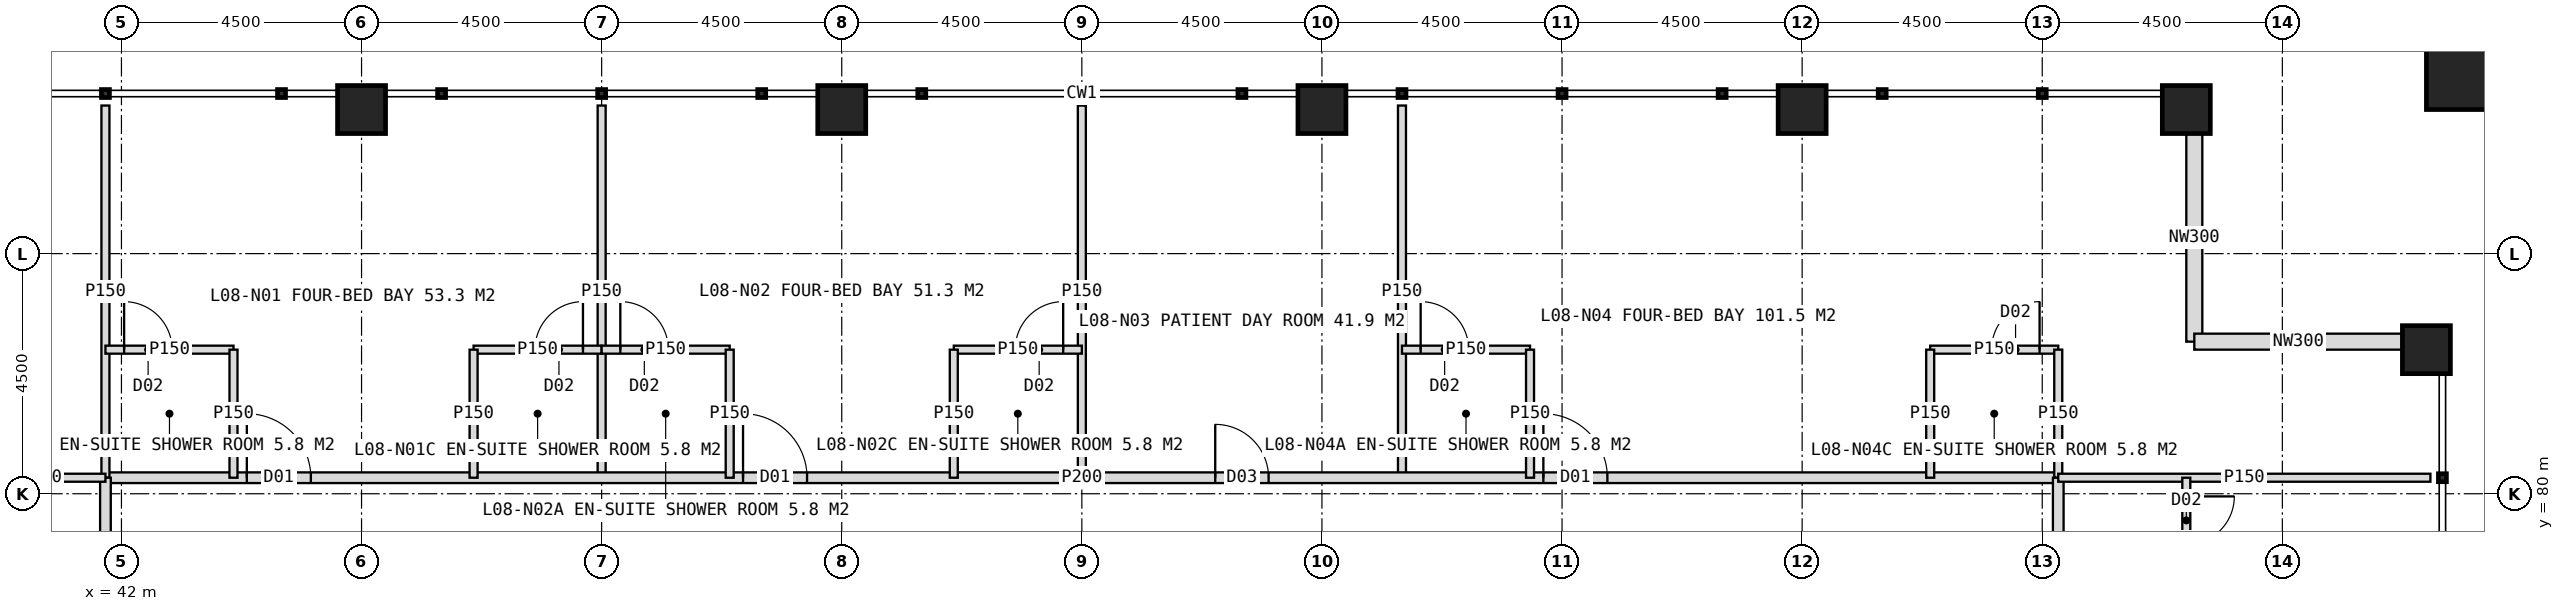
"""IFC4 building model, lengths in metres.
Left out: names, types, materials, properties, quantities, classifications, styles, units other than length and angle.
Written with IfcOpenShell. Run it as: python <this file> out.ifc"""

import sys

from ifc_helpers import new_model, si_unit, direction, frame, frame_2d, origin, origin_2d, place, context, subcontext, project, spatial, rectangle, hollow_rectangle, extrude, element, fill, save


model = new_model("IFC4")
c1 = context("Model", 3, precision=1e-05, world=origin(), true_north=direction((0.0, 1.0)))
c2 = subcontext(c1, "Body", "Model", "MODEL_VIEW")
j1 = project(units=[si_unit("LENGTHUNIT", "METRE"), si_unit("PLANEANGLEUNIT", "RADIAN")], contexts=[c1])
p1 = place(None, origin())
s1 = spatial("IfcSite", under=j1, at=p1, CompositionType="ELEMENT")
p2 = place(p1, origin())
s2 = spatial("IfcBuilding", under=s1, at=p2, CompositionType="ELEMENT")
p3 = place(p2, frame((0.0, 0.0, 39.0)))
s3 = spatial("IfcBuildingStorey", under=s2, at=p3, CompositionType="ELEMENT", Elevation=39.0)
for number, where, z_axis, x_axis in (
    (1, (46.5, 87.2, 0.0), (0.0, 0.0, 1.0), (1.0, 0.0, 0.0)),
    (2, (55.5, 87.2, 0.0), (0.0, 0.0, 1.0), (1.0, 0.0, 0.0)),
    (3, (64.5, 87.2, 0.0), (0.0, 0.0, 1.0), (1.0, 0.0, 0.0)),
    (4, (73.5, 87.2, 0.0), (0.0, 0.0, 1.0), (1.0, 0.0, 0.0)),
    (5, (80.7, 87.2, 0.0), (0.0, 0.0, 1.0), (1.0, 0.0, 0.0)),
    (6, (85.2, 82.7, 0.0), (0.0, 0.0, 1.0), (1.0, 0.0, 0.0)),
):
    element("IfcColumn", number, at=place(p3, frame(where, z_axis=z_axis, x_axis=x_axis)), inside=s3, PredefinedType="COLUMN", context=c2, shape_type="SweptSolid", body=[
        extrude(hollow_rectangle(XDim=0.9, YDim=0.9, WallThickness=0.08, at=origin_2d()), origin(), (0.0, 0.0, 1.0), 4.0),
    ])
p4 = place(p3, frame((86.1, 88.1, 0.0), z_axis=(0.0, 0.0, 1.0), x_axis=(1.0, 0.0, 0.0)))
e7 = element("IfcColumn", 7, at=p4, inside=s3, PredefinedType="COLUMN", context=c2, shape_type="SweptSolid", body=[
    extrude(hollow_rectangle(XDim=1.8, YDim=1.8, WallThickness=0.1, at=origin_2d()), origin(), (0.0, 0.0, 1.0), 4.0),
])
for number, where, z_axis, x_axis in (
    (8, (80.85, 86.75, 0.0), (0.0, 0.0, 1.0), (0.0, -1.0, 0.0)),
    (9, (80.85, 82.85, 0.0), (0.0, 0.0, 1.0), (1.0, 0.0, 0.0)),
):
    element("IfcWall", number, at=place(p3, frame(where, z_axis=z_axis, x_axis=x_axis)), inside=s3, PredefinedType="ELEMENTEDWALL", context=c2, shape_type="SweptSolid", body=[
        extrude(rectangle(XDim=3.9, YDim=0.3, at=frame_2d((1.95, 0.0))), origin(), (0.0, 0.0, 1.0), 2.95),
    ])
p5 = place(p3, frame((51.0, 80.3, 0.0), z_axis=(0.0, 0.0, 1.0), x_axis=(0.0, 1.0, 0.0)))
e10 = element("IfcWall", 10, at=p5, inside=s3, PredefinedType="PARTITIONING", context=c2, shape_type="SweptSolid", body=[
    extrude(rectangle(XDim=6.975, YDim=0.15, at=frame_2d((3.487, 0.0))), origin(), (0.0, 0.0, 1.0), 3.75),
])
p6 = place(p3, frame((60.0, 80.3, 0.0), z_axis=(0.0, 0.0, 1.0), x_axis=(0.0, 1.0, 0.0)))
e11 = element("IfcWall", 11, at=p6, inside=s3, PredefinedType="PARTITIONING", context=c2, shape_type="SweptSolid", body=[
    extrude(rectangle(XDim=6.975, YDim=0.15, at=frame_2d((3.487, 0.0))), origin(), (0.0, 0.0, 1.0), 2.75),
])
p7 = place(p3, frame((66.0, 80.3, 0.0), z_axis=(0.0, 0.0, 1.0), x_axis=(0.0, 1.0, 0.0)))
e12 = element("IfcWall", 12, at=p7, inside=s3, PredefinedType="PARTITIONING", context=c2, shape_type="SweptSolid", body=[
    extrude(rectangle(XDim=6.975, YDim=0.15, at=frame_2d((3.487, 0.0))), origin(), (0.0, 0.0, 1.0), 3.75),
])
p8 = place(p3, frame((41.7, 80.3, 0.0), z_axis=(0.0, 0.0, 1.0), x_axis=(1.0, 0.0, 0.0)))
e13 = element("IfcWall", 13, at=p8, inside=s3, PredefinedType="PARTITIONING", context=c2, shape_type="SweptSolid", body=[
    extrude(rectangle(XDim=36.6, YDim=0.2, at=frame_2d((18.3, 0.0))), origin(), (0.0, 0.0, 1.0), 3.75),
])
p9 = place(p8, frame((2.65, 0.0, 0.0)))
e14 = element("IfcOpeningElement", 14, at=p9, cuts=e13, PredefinedType="OPENING", context=c2, shape_type="SweptSolid", body=[
    extrude(rectangle(XDim=1.2, YDim=2.2, at=frame_2d((0.6, 1.1))), frame((0.0, 0.11, 0.0), z_axis=(0.0, -1.0, 0.0), x_axis=(1.0, 0.0, 0.0)), (0.0, 0.0, 1.0), 0.22),
])
p10 = place(p8, frame((11.95, 0.0, 0.0)))
e15 = element("IfcOpeningElement", 15, at=p10, cuts=e13, PredefinedType="OPENING", context=c2, shape_type="SweptSolid", body=[
    extrude(rectangle(XDim=1.2, YDim=2.2, at=frame_2d((0.6, 1.1))), frame((0.0, 0.11, 0.0), z_axis=(0.0, -1.0, 0.0), x_axis=(1.0, 0.0, 0.0)), (0.0, 0.0, 1.0), 0.22),
])
p11 = place(p8, frame((20.8, 0.0, 0.0)))
e16 = element("IfcOpeningElement", 16, at=p11, cuts=e13, PredefinedType="OPENING", context=c2, shape_type="SweptSolid", body=[
    extrude(rectangle(XDim=1.0, YDim=2.1, at=frame_2d((0.5, 1.05))), frame((0.0, 0.11, 0.0), z_axis=(0.0, -1.0, 0.0), x_axis=(1.0, 0.0, 0.0)), (0.0, 0.0, 1.0), 0.22),
])
p12 = place(p8, frame((26.95, 0.0, 0.0)))
e17 = element("IfcOpeningElement", 17, at=p12, cuts=e13, PredefinedType="OPENING", context=c2, shape_type="SweptSolid", body=[
    extrude(rectangle(XDim=1.2, YDim=2.2, at=frame_2d((0.6, 1.1))), frame((0.0, 0.11, 0.0), z_axis=(0.0, -1.0, 0.0), x_axis=(1.0, 0.0, 0.0)), (0.0, 0.0, 1.0), 0.22),
])
p13 = place(p3, frame((41.7, 80.3, 0.0), z_axis=(0.0, 0.0, 1.0), x_axis=(0.0, 1.0, 0.0)))
e18 = element("IfcWall", 18, at=p13, inside=s3, PredefinedType="PARTITIONING", context=c2, shape_type="SweptSolid", body=[
    extrude(rectangle(XDim=6.975, YDim=0.15, at=frame_2d((3.487, 0.0))), origin(), (0.0, 0.0, 1.0), 3.75),
])
p14 = place(p3, frame((41.7, 82.7, 0.0), z_axis=(0.0, 0.0, 1.0), x_axis=(1.0, 0.0, 0.0)))
e19 = element("IfcWall", 19, at=p14, inside=s3, PredefinedType="PARTITIONING", context=c2, shape_type="SweptSolid", body=[
    extrude(rectangle(XDim=2.4, YDim=0.15, at=frame_2d((1.2, 0.0))), origin(), (0.0, 0.0, 1.0), 2.95),
])
p15 = place(p14, frame((0.35, 0.0, 0.0)))
e20 = element("IfcOpeningElement", 20, at=p15, cuts=e19, PredefinedType="OPENING", context=c2, shape_type="SweptSolid", body=[
    extrude(rectangle(XDim=0.9, YDim=2.1, at=frame_2d((0.45, 1.05))), frame((0.0, 0.085, 0.0), z_axis=(0.0, -1.0, 0.0), x_axis=(1.0, 0.0, 0.0)), (0.0, 0.0, 1.0), 0.17),
])
p16 = place(p3, frame((44.1, 80.3, 0.0), z_axis=(0.0, 0.0, 1.0), x_axis=(0.0, 1.0, 0.0)))
e21 = element("IfcWall", 21, at=p16, inside=s3, PredefinedType="PARTITIONING", context=c2, shape_type="SweptSolid", body=[
    extrude(rectangle(XDim=2.4, YDim=0.15, at=frame_2d((1.2, 0.0))), origin(), (0.0, 0.0, 1.0), 3.75),
])
p17 = place(p3, frame((48.6, 82.7, 0.0), z_axis=(0.0, 0.0, 1.0), x_axis=(1.0, 0.0, 0.0)))
e22 = element("IfcWall", 22, at=p17, inside=s3, PredefinedType="PARTITIONING", context=c2, shape_type="SweptSolid", body=[
    extrude(rectangle(XDim=2.4, YDim=0.15, at=frame_2d((1.2, 0.0))), origin(), (0.0, 0.0, 1.0), 3.75),
])
p18 = place(p17, frame((1.15, 0.0, 0.0)))
e23 = element("IfcOpeningElement", 23, at=p18, cuts=e22, PredefinedType="OPENING", context=c2, shape_type="SweptSolid", body=[
    extrude(rectangle(XDim=0.9, YDim=2.1, at=frame_2d((0.45, 1.05))), frame((0.0, 0.085, 0.0), z_axis=(0.0, -1.0, 0.0), x_axis=(1.0, 0.0, 0.0)), (0.0, 0.0, 1.0), 0.17),
])
p19 = place(p3, frame((48.6, 80.3, 0.0), z_axis=(0.0, 0.0, 1.0), x_axis=(0.0, 1.0, 0.0)))
e24 = element("IfcWall", 24, at=p19, inside=s3, PredefinedType="PARTITIONING", context=c2, shape_type="SweptSolid", body=[
    extrude(rectangle(XDim=2.4, YDim=0.15, at=frame_2d((1.2, 0.0))), origin(), (0.0, 0.0, 1.0), 3.75),
])
p20 = place(p3, frame((51.0, 82.7, 0.0), z_axis=(0.0, 0.0, 1.0), x_axis=(1.0, 0.0, 0.0)))
e25 = element("IfcWall", 25, at=p20, inside=s3, PredefinedType="PARTITIONING", context=c2, shape_type="SweptSolid", body=[
    extrude(rectangle(XDim=2.4, YDim=0.15, at=frame_2d((1.2, 0.0))), origin(), (0.0, 0.0, 1.0), 3.75),
])
p21 = place(p20, frame((0.35, 0.0, 0.0)))
e26 = element("IfcOpeningElement", 26, at=p21, cuts=e25, PredefinedType="OPENING", context=c2, shape_type="SweptSolid", body=[
    extrude(rectangle(XDim=0.9, YDim=2.1, at=frame_2d((0.45, 1.05))), frame((0.0, 0.085, 0.0), z_axis=(0.0, -1.0, 0.0), x_axis=(1.0, 0.0, 0.0)), (0.0, 0.0, 1.0), 0.17),
])
p22 = place(p3, frame((53.4, 80.3, 0.0), z_axis=(0.0, 0.0, 1.0), x_axis=(0.0, 1.0, 0.0)))
e27 = element("IfcWall", 27, at=p22, inside=s3, PredefinedType="PARTITIONING", context=c2, shape_type="SweptSolid", body=[
    extrude(rectangle(XDim=2.4, YDim=0.15, at=frame_2d((1.2, 0.0))), origin(), (0.0, 0.0, 1.0), 3.75),
])
p23 = place(p3, frame((57.6, 82.7, 0.0), z_axis=(0.0, 0.0, 1.0), x_axis=(1.0, 0.0, 0.0)))
e28 = element("IfcWall", 28, at=p23, inside=s3, PredefinedType="PARTITIONING", context=c2, shape_type="SweptSolid", body=[
    extrude(rectangle(XDim=2.4, YDim=0.15, at=frame_2d((1.2, 0.0))), origin(), (0.0, 0.0, 1.0), 3.75),
])
p24 = place(p23, frame((1.15, 0.0, 0.0)))
e29 = element("IfcOpeningElement", 29, at=p24, cuts=e28, PredefinedType="OPENING", context=c2, shape_type="SweptSolid", body=[
    extrude(rectangle(XDim=0.9, YDim=2.1, at=frame_2d((0.45, 1.05))), frame((0.0, 0.085, 0.0), z_axis=(0.0, -1.0, 0.0), x_axis=(1.0, 0.0, 0.0)), (0.0, 0.0, 1.0), 0.17),
])
p25 = place(p3, frame((57.6, 80.3, 0.0), z_axis=(0.0, 0.0, 1.0), x_axis=(0.0, 1.0, 0.0)))
e30 = element("IfcWall", 30, at=p25, inside=s3, PredefinedType="PARTITIONING", context=c2, shape_type="SweptSolid", body=[
    extrude(rectangle(XDim=2.4, YDim=0.15, at=frame_2d((1.2, 0.0))), origin(), (0.0, 0.0, 1.0), 3.75),
])
p26 = place(p3, frame((66.0, 82.7, 0.0), z_axis=(0.0, 0.0, 1.0), x_axis=(1.0, 0.0, 0.0)))
e31 = element("IfcWall", 31, at=p26, inside=s3, PredefinedType="PARTITIONING", context=c2, shape_type="SweptSolid", body=[
    extrude(rectangle(XDim=2.4, YDim=0.15, at=frame_2d((1.2, 0.0))), origin(), (0.0, 0.0, 1.0), 3.75),
])
p27 = place(p26, frame((0.35, 0.0, 0.0)))
e32 = element("IfcOpeningElement", 32, at=p27, cuts=e31, PredefinedType="OPENING", context=c2, shape_type="SweptSolid", body=[
    extrude(rectangle(XDim=0.9, YDim=2.1, at=frame_2d((0.45, 1.05))), frame((0.0, 0.085, 0.0), z_axis=(0.0, -1.0, 0.0), x_axis=(1.0, 0.0, 0.0)), (0.0, 0.0, 1.0), 0.17),
])
p28 = place(p3, frame((68.4, 80.3, 0.0), z_axis=(0.0, 0.0, 1.0), x_axis=(0.0, 1.0, 0.0)))
e33 = element("IfcWall", 33, at=p28, inside=s3, PredefinedType="PARTITIONING", context=c2, shape_type="SweptSolid", body=[
    extrude(rectangle(XDim=2.4, YDim=0.15, at=frame_2d((1.2, 0.0))), origin(), (0.0, 0.0, 1.0), 3.75),
])
p29 = place(p3, frame((75.9, 82.7, 0.0), z_axis=(0.0, 0.0, 1.0), x_axis=(1.0, 0.0, 0.0)))
e34 = element("IfcWall", 34, at=p29, inside=s3, PredefinedType="PARTITIONING", context=c2, shape_type="SweptSolid", body=[
    extrude(rectangle(XDim=2.4, YDim=0.15, at=frame_2d((1.2, 0.0))), origin(), (0.0, 0.0, 1.0), 2.95),
])
p30 = place(p29, frame((1.15, 0.0, 0.0)))
e35 = element("IfcOpeningElement", 35, at=p30, cuts=e34, PredefinedType="OPENING", context=c2, shape_type="SweptSolid", body=[
    extrude(rectangle(XDim=0.9, YDim=2.1, at=frame_2d((0.45, 1.05))), frame((0.0, 0.085, 0.0), z_axis=(0.0, -1.0, 0.0), x_axis=(1.0, 0.0, 0.0)), (0.0, 0.0, 1.0), 0.17),
])
for number, where, z_axis, x_axis in (
    (36, (75.9, 80.3, 0.0), (0.0, 0.0, 1.0), (0.0, 1.0, 0.0)),
    (37, (78.3, 80.3, 0.0), (0.0, 0.0, 1.0), (0.0, 1.0, 0.0)),
):
    element("IfcWall", number, at=place(p3, frame(where, z_axis=z_axis, x_axis=x_axis)), inside=s3, PredefinedType="PARTITIONING", context=c2, shape_type="SweptSolid", body=[
        extrude(rectangle(XDim=2.4, YDim=0.15, at=frame_2d((1.2, 0.0))), origin(), (0.0, 0.0, 1.0), 3.75),
    ])
p31 = place(p3, frame((41.7, 43.7, 0.0), z_axis=(0.0, 0.0, 1.0), x_axis=(0.0, 1.0, 0.0)))
e38 = element("IfcWall", 38, at=p31, inside=s3, PredefinedType="PARTITIONING", context=c2, shape_type="SweptSolid", body=[
    extrude(rectangle(XDim=36.6, YDim=0.2, at=frame_2d((18.3, 0.0))), origin(), (0.0, 0.0, 1.0), 3.75),
])
p32 = place(p31, frame((2.65, 0.0, 0.0)))
e39 = element("IfcOpeningElement", 39, at=p32, cuts=e38, PredefinedType="OPENING", context=c2, shape_type="SweptSolid", body=[
    extrude(rectangle(XDim=1.2, YDim=2.2, at=frame_2d((0.6, 1.1))), frame((0.0, 0.11, 0.0), z_axis=(0.0, -1.0, 0.0), x_axis=(1.0, 0.0, 0.0)), (0.0, 0.0, 1.0), 0.22),
])
p33 = place(p31, frame((8.95, 0.0, 0.0)))
e40 = element("IfcOpeningElement", 40, at=p33, cuts=e38, PredefinedType="OPENING", context=c2, shape_type="SweptSolid", body=[
    extrude(rectangle(XDim=1.2, YDim=2.2, at=frame_2d((0.6, 1.1))), frame((0.0, 0.11, 0.0), z_axis=(0.0, -1.0, 0.0), x_axis=(1.0, 0.0, 0.0)), (0.0, 0.0, 1.0), 0.22),
])
p34 = place(p31, frame((14.95, 0.0, 0.0)))
e41 = element("IfcOpeningElement", 41, at=p34, cuts=e38, PredefinedType="OPENING", context=c2, shape_type="SweptSolid", body=[
    extrude(rectangle(XDim=1.2, YDim=2.2, at=frame_2d((0.6, 1.1))), frame((0.0, 0.11, 0.0), z_axis=(0.0, -1.0, 0.0), x_axis=(1.0, 0.0, 0.0)), (0.0, 0.0, 1.0), 0.22),
])
p35 = place(p31, frame((20.95, 0.0, 0.0)))
e42 = element("IfcOpeningElement", 42, at=p35, cuts=e38, PredefinedType="OPENING", context=c2, shape_type="SweptSolid", body=[
    extrude(rectangle(XDim=1.2, YDim=2.2, at=frame_2d((0.6, 1.1))), frame((0.0, 0.11, 0.0), z_axis=(0.0, -1.0, 0.0), x_axis=(1.0, 0.0, 0.0)), (0.0, 0.0, 1.0), 0.22),
])
p36 = place(p31, frame((29.95, 0.0, 0.0)))
e43 = element("IfcOpeningElement", 43, at=p36, cuts=e38, PredefinedType="OPENING", context=c2, shape_type="SweptSolid", body=[
    extrude(rectangle(XDim=1.2, YDim=2.2, at=frame_2d((0.6, 1.1))), frame((0.0, 0.11, 0.0), z_axis=(0.0, -1.0, 0.0), x_axis=(1.0, 0.0, 0.0)), (0.0, 0.0, 1.0), 0.22),
])
p37 = place(p3, frame((41.7, 80.3, 0.0), z_axis=(0.0, 0.0, 1.0), x_axis=(-1.0, 0.0, 0.0)))
e44 = element("IfcWall", 44, at=p37, inside=s3, PredefinedType="PARTITIONING", context=c2, shape_type="SweptSolid", body=[
    extrude(rectangle(XDim=2.4, YDim=0.15, at=frame_2d((1.2, 0.0))), origin(), (0.0, 0.0, 1.0), 3.75),
])
p38 = place(p3, frame((78.3, 80.3, 0.0), z_axis=(0.0, 0.0, 1.0), x_axis=(0.0, -1.0, 0.0)))
e45 = element("IfcWall", 45, at=p38, inside=s3, PredefinedType="PARTITIONING", context=c2, shape_type="SweptSolid", body=[
    extrude(rectangle(XDim=36.6, YDim=0.2, at=frame_2d((18.3, 0.0))), origin(), (0.0, 0.0, 1.0), 3.75),
])
p39 = place(p38, frame((2.65, 0.0, 0.0)))
e46 = element("IfcOpeningElement", 46, at=p39, cuts=e45, PredefinedType="OPENING", context=c2, shape_type="SweptSolid", body=[
    extrude(rectangle(XDim=1.2, YDim=2.2, at=frame_2d((0.6, 1.1))), frame((0.0, 0.11, 0.0), z_axis=(0.0, -1.0, 0.0), x_axis=(1.0, 0.0, 0.0)), (0.0, 0.0, 1.0), 0.22),
])
p40 = place(p38, frame((11.95, 0.0, 0.0)))
e47 = element("IfcOpeningElement", 47, at=p40, cuts=e45, PredefinedType="OPENING", context=c2, shape_type="SweptSolid", body=[
    extrude(rectangle(XDim=1.2, YDim=2.2, at=frame_2d((0.6, 1.1))), frame((0.0, 0.11, 0.0), z_axis=(0.0, -1.0, 0.0), x_axis=(1.0, 0.0, 0.0)), (0.0, 0.0, 1.0), 0.22),
])
p41 = place(p38, frame((20.95, 0.0, 0.0)))
e48 = element("IfcOpeningElement", 48, at=p41, cuts=e45, PredefinedType="OPENING", context=c2, shape_type="SweptSolid", body=[
    extrude(rectangle(XDim=1.2, YDim=2.2, at=frame_2d((0.6, 1.1))), frame((0.0, 0.11, 0.0), z_axis=(0.0, -1.0, 0.0), x_axis=(1.0, 0.0, 0.0)), (0.0, 0.0, 1.0), 0.22),
])
p42 = place(p38, frame((29.95, 0.0, 0.0)))
e49 = element("IfcOpeningElement", 49, at=p42, cuts=e45, PredefinedType="OPENING", context=c2, shape_type="SweptSolid", body=[
    extrude(rectangle(XDim=1.2, YDim=2.2, at=frame_2d((0.6, 1.1))), frame((0.0, 0.11, 0.0), z_axis=(0.0, -1.0, 0.0), x_axis=(1.0, 0.0, 0.0)), (0.0, 0.0, 1.0), 0.22),
])
p43 = place(p3, frame((78.3, 80.3, 0.0), z_axis=(0.0, 0.0, 1.0), x_axis=(1.0, 0.0, 0.0)))
e50 = element("IfcWall", 50, at=p43, inside=s3, PredefinedType="PARTITIONING", context=c2, shape_type="SweptSolid", body=[
    extrude(rectangle(XDim=6.975, YDim=0.15, at=frame_2d((3.487, 0.0))), origin(), (0.0, 0.0, 1.0), 3.75),
])
p44 = place(p3, frame((80.7, 80.3, 0.0), z_axis=(0.0, 0.0, 1.0), x_axis=(0.0, -1.0, 0.0)))
e51 = element("IfcWall", 51, at=p44, inside=s3, PredefinedType="PARTITIONING", context=c2, shape_type="SweptSolid", body=[
    extrude(rectangle(XDim=2.4, YDim=0.15, at=frame_2d((1.2, 0.0))), origin(), (0.0, 0.0, 1.0), 2.95),
])
p45 = place(p44, frame((0.35, 0.0, 0.0)))
e52 = element("IfcOpeningElement", 52, at=p45, cuts=e51, PredefinedType="OPENING", context=c2, shape_type="SweptSolid", body=[
    extrude(rectangle(XDim=0.9, YDim=2.1, at=frame_2d((0.45, 1.05))), frame((0.0, 0.085, 0.0), z_axis=(0.0, -1.0, 0.0), x_axis=(1.0, 0.0, 0.0)), (0.0, 0.0, 1.0), 0.17),
])
p46 = place(p9, origin())
e53 = element("IfcDoor", 53, at=p46, inside=s3, OperationType="SINGLE_SWING_LEFT", PredefinedType="DOOR", context=c2, shape_type="SweptSolid", body=[
    extrude(rectangle(XDim=1.2, YDim=2.2, at=frame_2d((0.6, 1.1))), frame((0.0, 0.025, 0.0), z_axis=(0.0, -1.0, 0.0), x_axis=(1.0, 0.0, 0.0)), (0.0, 0.0, 1.0), 0.05),
])
fill(e14, e53)
p47 = place(p15, origin())
e54 = element("IfcDoor", 54, at=p47, inside=s3, OperationType="SINGLE_SWING_LEFT", PredefinedType="DOOR", context=c2, shape_type="SweptSolid", body=[
    extrude(rectangle(XDim=0.9, YDim=2.1, at=frame_2d((0.45, 1.05))), frame((0.0, 0.025, 0.0), z_axis=(0.0, -1.0, 0.0), x_axis=(1.0, 0.0, 0.0)), (0.0, 0.0, 1.0), 0.05),
])
fill(e20, e54)
p48 = place(p18, origin())
e55 = element("IfcDoor", 55, at=p48, inside=s3, OperationType="SINGLE_SWING_RIGHT", PredefinedType="DOOR", context=c2, shape_type="SweptSolid", body=[
    extrude(rectangle(XDim=0.9, YDim=2.1, at=frame_2d((0.45, 1.05))), frame((0.0, 0.025, 0.0), z_axis=(0.0, -1.0, 0.0), x_axis=(1.0, 0.0, 0.0)), (0.0, 0.0, 1.0), 0.05),
])
fill(e23, e55)
p49 = place(p10, origin())
e56 = element("IfcDoor", 56, at=p49, inside=s3, OperationType="SINGLE_SWING_LEFT", PredefinedType="DOOR", context=c2, shape_type="SweptSolid", body=[
    extrude(rectangle(XDim=1.2, YDim=2.2, at=frame_2d((0.6, 1.1))), frame((0.0, 0.025, 0.0), z_axis=(0.0, -1.0, 0.0), x_axis=(1.0, 0.0, 0.0)), (0.0, 0.0, 1.0), 0.05),
])
fill(e15, e56)
p50 = place(p21, origin())
e57 = element("IfcDoor", 57, at=p50, inside=s3, OperationType="SINGLE_SWING_LEFT", PredefinedType="DOOR", context=c2, shape_type="SweptSolid", body=[
    extrude(rectangle(XDim=0.9, YDim=2.1, at=frame_2d((0.45, 1.05))), frame((0.0, 0.025, 0.0), z_axis=(0.0, -1.0, 0.0), x_axis=(1.0, 0.0, 0.0)), (0.0, 0.0, 1.0), 0.05),
])
fill(e26, e57)
p51 = place(p24, origin())
e58 = element("IfcDoor", 58, at=p51, inside=s3, OperationType="SINGLE_SWING_RIGHT", PredefinedType="DOOR", context=c2, shape_type="SweptSolid", body=[
    extrude(rectangle(XDim=0.9, YDim=2.1, at=frame_2d((0.45, 1.05))), frame((0.0, 0.025, 0.0), z_axis=(0.0, -1.0, 0.0), x_axis=(1.0, 0.0, 0.0)), (0.0, 0.0, 1.0), 0.05),
])
fill(e29, e58)
p52 = place(p11, origin())
e59 = element("IfcDoor", 59, at=p52, inside=s3, OperationType="SINGLE_SWING_LEFT", PredefinedType="DOOR", context=c2, shape_type="SweptSolid", body=[
    extrude(rectangle(XDim=1.0, YDim=2.1, at=frame_2d((0.5, 1.05))), frame((0.0, 0.025, 0.0), z_axis=(0.0, -1.0, 0.0), x_axis=(1.0, 0.0, 0.0)), (0.0, 0.0, 1.0), 0.05),
])
fill(e16, e59)
p53 = place(p12, origin())
e60 = element("IfcDoor", 60, at=p53, inside=s3, OperationType="SINGLE_SWING_LEFT", PredefinedType="DOOR", context=c2, shape_type="SweptSolid", body=[
    extrude(rectangle(XDim=1.2, YDim=2.2, at=frame_2d((0.6, 1.1))), frame((0.0, 0.025, 0.0), z_axis=(0.0, -1.0, 0.0), x_axis=(1.0, 0.0, 0.0)), (0.0, 0.0, 1.0), 0.05),
])
fill(e17, e60)
p54 = place(p27, origin())
e61 = element("IfcDoor", 61, at=p54, inside=s3, OperationType="SINGLE_SWING_LEFT", PredefinedType="DOOR", context=c2, shape_type="SweptSolid", body=[
    extrude(rectangle(XDim=0.9, YDim=2.1, at=frame_2d((0.45, 1.05))), frame((0.0, 0.025, 0.0), z_axis=(0.0, -1.0, 0.0), x_axis=(1.0, 0.0, 0.0)), (0.0, 0.0, 1.0), 0.05),
])
fill(e32, e61)
p55 = place(p30, origin())
e62 = element("IfcDoor", 62, at=p55, inside=s3, OperationType="SINGLE_SWING_RIGHT", PredefinedType="DOOR", context=c2, shape_type="SweptSolid", body=[
    extrude(rectangle(XDim=0.9, YDim=2.1, at=frame_2d((0.45, 1.05))), frame((0.0, 0.025, 0.0), z_axis=(0.0, -1.0, 0.0), x_axis=(1.0, 0.0, 0.0)), (0.0, 0.0, 1.0), 0.05),
])
fill(e35, e62)
p56 = place(p45, origin())
e63 = element("IfcDoor", 63, at=p56, inside=s3, OperationType="SINGLE_SWING_LEFT", PredefinedType="DOOR", context=c2, shape_type="SweptSolid", body=[
    extrude(rectangle(XDim=0.9, YDim=2.1, at=frame_2d((0.45, 1.05))), frame((0.0, 0.025, 0.0), z_axis=(0.0, -1.0, 0.0), x_axis=(1.0, 0.0, 0.0)), (0.0, 0.0, 1.0), 0.05),
])
fill(e52, e63)
save(model, sys.argv[1])
